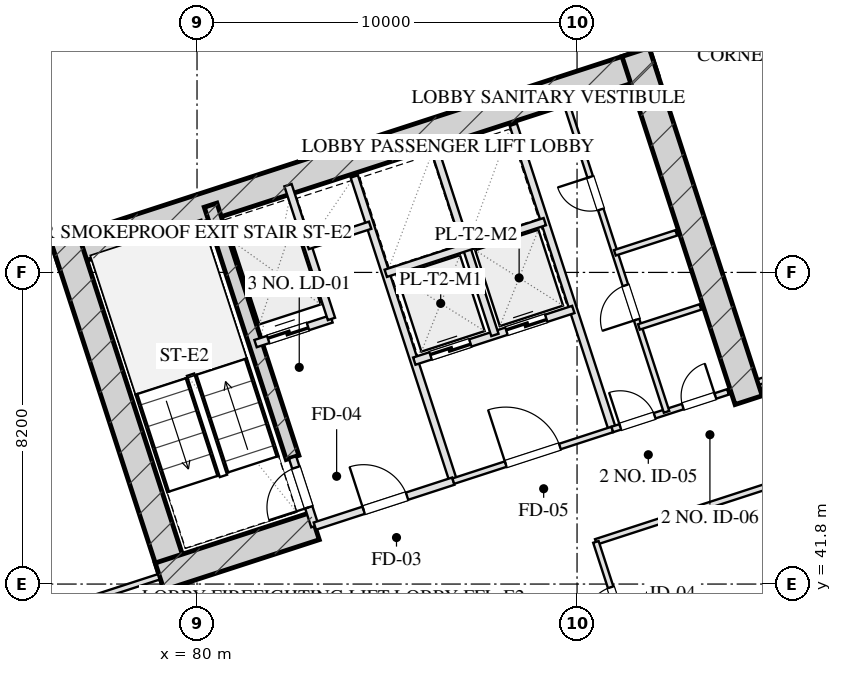
"""IFC4 building model, lengths in metres.
Left out: names, types, materials, properties, quantities, classifications, styles, units other than length and angle.
Written with IfcOpenShell. Run it as: python <this file> out.ifc"""

import sys

from ifc_helpers import new_model, si_unit, direction, frame, frame_2d, origin, place, context, subcontext, project, spatial, rectangle, extrude, element, fill, save


model = new_model("IFC4")
c1 = context("Model", 3, precision=1e-05, world=origin(), true_north=direction((0.0, 1.0)))
c2 = subcontext(c1, "Body", "Model", "MODEL_VIEW")
j1 = project(units=[si_unit("LENGTHUNIT", "METRE"), si_unit("PLANEANGLEUNIT", "RADIAN")], contexts=[c1])
p1 = place(None, origin())
s1 = spatial("IfcSite", under=j1, at=p1, CompositionType="ELEMENT")
p2 = place(p1, origin())
s2 = spatial("IfcBuilding", under=s1, at=p2, CompositionType="ELEMENT")
p3 = place(p2, frame((0.0, 0.0, 67.85)))
s3 = spatial("IfcBuildingStorey", under=s2, at=p3, CompositionType="ELEMENT", Elevation=67.85)
p4 = place(p3, frame((76.272, 50.443, 0.0), z_axis=(0.0, 0.0, 1.0), x_axis=(0.951056072937, 0.309018358888, 0.0)))
e1 = element("IfcWall", 1, at=p4, inside=s3, PredefinedType="SHEAR", context=c2, shape_type="SweptSolid", body=[
    extrude(rectangle(XDim=16.55, YDim=0.75, at=frame_2d((8.275, 0.0))), origin(), (0.0, 0.0, 1.0), 3.45),
])
for number, where, z_axis, x_axis in (
    (2, (79.489, 41.756, 0.0), (0.0, 0.0, 1.0), (-0.309, 0.951, 0.0)),
    (3, (94.515, 46.639, 0.0), (0.0, 0.0, 1.0), (-0.309, 0.951, 0.0)),
):
    element("IfcWall", number, at=place(p3, frame(where, z_axis=z_axis, x_axis=x_axis)), inside=s3, PredefinedType="SHEAR", context=c2, shape_type="SweptSolid", body=[
        extrude(rectangle(XDim=9.63, YDim=0.75, at=frame_2d((4.815, 0.0))), origin(), (0.0, 0.0, 1.0), 3.45),
    ])
p5 = place(p3, frame((82.514, 45.131, 0.0), z_axis=(0.0, 0.0, 1.0), x_axis=(-0.308988790936, 0.951065679686, 0.0)))
e4 = element("IfcWall", 4, at=p5, inside=s3, PredefinedType="SHEAR", context=c2, shape_type="SweptSolid", body=[
    extrude(rectangle(XDim=6.98, YDim=0.35, at=frame_2d((3.49, 0.0))), origin(), (0.0, 0.0, 1.0), 3.45),
])
p6 = place(p3, frame((79.016, 41.997, 0.0), z_axis=(0.0, 0.0, 1.0), x_axis=(0.95106038264, 0.309005094736, 0.0)))
e5 = element("IfcWall", 5, at=p6, inside=s3, PredefinedType="SHEAR", context=c2, shape_type="SweptSolid", body=[
    extrude(rectangle(XDim=4.295, YDim=0.75, at=frame_2d((2.147, 0.0))), origin(), (0.0, 0.0, 1.0), 3.45),
])
p7 = place(p3, frame((79.655, 4.352, 0.0), z_axis=(0.0, 0.0, 1.0), x_axis=(-0.309014526607, 0.951057318118, 0.0)))
e6 = element("IfcWall", 6, at=p7, inside=s3, PredefinedType="SOLIDWALL", context=c2, shape_type="SweptSolid", body=[
    extrude(rectangle(XDim=50.0, YDim=0.4, at=frame_2d((25.0, 0.0))), origin(), (0.0, 0.0, 1.0), 2.61),
])
p8 = place(p7, frame((30.15, 0.0, 0.75)))
e7 = element("IfcOpeningElement", 7, at=p8, cuts=e6, PredefinedType="OPENING", context=c2, shape_type="SweptSolid", body=[
    extrude(rectangle(XDim=2.5, YDim=1.46, at=frame_2d((1.25, 0.73))), frame((0.0, 0.21, 0.0), z_axis=(0.0, -1.0, 0.0), x_axis=(1.0, 0.0, 0.0)), (0.0, 0.0, 1.0), 0.42),
])
p9 = place(p7, frame((18.65, 0.0, 0.0)))
e8 = element("IfcOpeningElement", 8, at=p9, cuts=e6, PredefinedType="OPENING", context=c2, shape_type="SweptSolid", body=[
    extrude(rectangle(XDim=1.1, YDim=2.15, at=frame_2d((0.55, 1.075))), frame((0.0, 0.21, 0.0), z_axis=(0.0, -1.0, 0.0), x_axis=(1.0, 0.0, 0.0)), (0.0, 0.0, 1.0), 0.42),
])
p10 = place(p3, frame((66.002, 55.433, 0.0), z_axis=(0.0, 0.0, 1.0), x_axis=(0.951055939317, 0.309018770125, 0.0)))
e9 = element("IfcWall", 9, at=p10, inside=s3, PredefinedType="SOLIDWALL", context=c2, shape_type="SweptSolid", body=[
    extrude(rectangle(XDim=32.4, YDim=0.4, at=frame_2d((16.2, 0.0))), origin(), (0.0, 0.0, 1.0), 2.61),
])
p11 = place(p3, frame((83.101, 43.324, 0.0), z_axis=(0.0, 0.0, 1.0), x_axis=(-0.309048298632, 0.951046344356, 0.0)))
e10 = element("IfcWall", 10, at=p11, inside=s3, PredefinedType="PARTITIONING", context=c2, shape_type="SweptSolid", body=[
    extrude(rectangle(XDim=1.9, YDim=0.2, at=frame_2d((0.95, 0.0))), origin(), (0.0, 0.0, 1.0), 3.175),
])
p12 = place(p11, frame((0.52, 0.0, 0.0)))
e11 = element("IfcOpeningElement", 11, at=p12, cuts=e10, PredefinedType="OPENING", context=c2, shape_type="SweptSolid", body=[
    extrude(rectangle(XDim=1.1, YDim=2.05, at=frame_2d((0.55, 1.025))), frame((0.0, 0.11, 0.0), z_axis=(0.0, -1.0, 0.0), x_axis=(1.0, 0.0, 0.0)), (0.0, 0.0, 1.0), 0.22),
])
p13 = place(p3, frame((86.743, 44.508, 0.0), z_axis=(0.0, 0.0, 1.0), x_axis=(-0.309016001439, 0.951056838919, 0.0)))
e12 = element("IfcWall", 12, at=p13, inside=s3, PredefinedType="PARTITIONING", context=c2, shape_type="SweptSolid", body=[
    extrude(rectangle(XDim=8.43, YDim=0.2, at=frame_2d((4.215, 0.0))), origin(), (0.0, 0.0, 1.0), 3.175),
])
p14 = place(p3, frame((83.101, 43.324, 0.0), z_axis=(0.0, 0.0, 1.0), x_axis=(0.951052804469, 0.309028417967, 0.0)))
e13 = element("IfcWall", 13, at=p14, inside=s3, PredefinedType="PARTITIONING", context=c2, shape_type="SweptSolid", body=[
    extrude(rectangle(XDim=3.83, YDim=0.2, at=frame_2d((1.915, 0.0))), origin(), (0.0, 0.0, 1.0), 3.175),
])
p15 = place(p14, frame((1.35, 0.0, 0.0)))
e14 = element("IfcOpeningElement", 14, at=p15, cuts=e13, PredefinedType="OPENING", context=c2, shape_type="SweptSolid", body=[
    extrude(rectangle(XDim=1.2, YDim=2.05, at=frame_2d((0.6, 1.025))), frame((0.0, 0.11, 0.0), z_axis=(0.0, -1.0, 0.0), x_axis=(1.0, 0.0, 0.0)), (0.0, 0.0, 1.0), 0.22),
])
p16 = place(p3, frame((81.54, 48.127, 0.0), z_axis=(0.0, 0.0, 1.0), x_axis=(0.951062257173, 0.308999325213, 0.0)))
e15 = element("IfcWall", 15, at=p16, inside=s3, PredefinedType="PARTITIONING", context=c2, shape_type="SweptSolid", body=[
    extrude(rectangle(XDim=2.1, YDim=0.2, at=frame_2d((1.05, 0.0))), origin(), (0.0, 0.0, 1.0), 3.175),
])
p17 = place(p16, frame((0.35, 0.0, 0.0)))
e16 = element("IfcOpeningElement", 16, at=p17, cuts=e15, PredefinedType="OPENING", context=c2, shape_type="SweptSolid", body=[
    extrude(rectangle(XDim=1.1, YDim=2.05, at=frame_2d((0.55, 1.025))), frame((0.0, 0.11, 0.0), z_axis=(0.0, -1.0, 0.0), x_axis=(1.0, 0.0, 0.0)), (0.0, 0.0, 1.0), 0.22),
])
p18 = place(p3, frame((83.538, 48.776, 0.0), z_axis=(0.0, 0.0, 1.0), x_axis=(-0.3089935693, 0.951064127245, 0.0)))
e17 = element("IfcWall", 17, at=p18, inside=s3, PredefinedType="PARTITIONING", context=c2, shape_type="SweptSolid", body=[
    extrude(rectangle(XDim=3.7, YDim=0.2, at=frame_2d((1.85, 0.0))), origin(), (0.0, 0.0, 1.0), 3.175),
])
p19 = place(p3, frame((82.91, 50.707, 0.0), z_axis=(0.0, 0.0, 1.0), x_axis=(0.951041328149, 0.309063734775, 0.0)))
e18 = element("IfcWall", 18, at=p19, inside=s3, PredefinedType="PARTITIONING", context=c2, shape_type="SweptSolid", body=[
    extrude(rectangle(XDim=1.73, YDim=0.2, at=frame_2d((0.865, 0.0))), origin(), (0.0, 0.0, 1.0), 3.175),
])
p20 = place(p3, frame((90.928, 45.868, 0.0), z_axis=(0.0, 0.0, 1.0), x_axis=(-0.309042196757, 0.951048327176, 0.0)))
e19 = element("IfcWall", 19, at=p20, inside=s3, PredefinedType="PARTITIONING", context=c2, shape_type="SweptSolid", body=[
    extrude(rectangle(XDim=8.43, YDim=0.2, at=frame_2d((4.215, 0.0))), origin(), (0.0, 0.0, 1.0), 3.175),
])
p21 = place(p3, frame((86.743, 44.508, 0.0), z_axis=(0.0, 0.0, 1.0), x_axis=(0.951063829732, 0.308994485023, 0.0)))
e20 = element("IfcWall", 20, at=p21, inside=s3, PredefinedType="PARTITIONING", context=c2, shape_type="SweptSolid", body=[
    extrude(rectangle(XDim=4.4, YDim=0.15, at=frame_2d((2.2, 0.0))), origin(), (0.0, 0.0, 1.0), 3.175),
])
p22 = place(p21, frame((1.45, 0.0, 0.0)))
e21 = element("IfcOpeningElement", 21, at=p22, cuts=e20, PredefinedType="OPENING", context=c2, shape_type="SweptSolid", body=[
    extrude(rectangle(XDim=1.5, YDim=2.05, at=frame_2d((0.75, 1.025))), frame((0.0, 0.085, 0.0), z_axis=(0.0, -1.0, 0.0), x_axis=(1.0, 0.0, 0.0)), (0.0, 0.0, 1.0), 0.17),
])
p23 = place(p3, frame((85.718, 47.666, 0.0), z_axis=(0.0, 0.0, 1.0), x_axis=(0.951058531764, 0.30901079133, 0.0)))
e22 = element("IfcWall", 22, at=p23, inside=s3, PredefinedType="PARTITIONING", context=c2, shape_type="SweptSolid", body=[
    extrude(rectangle(XDim=4.4, YDim=0.2, at=frame_2d((2.2, 0.0))), origin(), (0.0, 0.0, 1.0), 3.175),
])
p24 = place(p23, frame((0.45, 0.0, 0.0)))
e23 = element("IfcOpeningElement", 23, at=p24, cuts=e22, PredefinedType="OPENING", context=c2, shape_type="SweptSolid", body=[
    extrude(rectangle(XDim=1.1, YDim=2.05, at=frame_2d((0.55, 1.025))), frame((0.0, 0.11, 0.0), z_axis=(0.0, -1.0, 0.0), x_axis=(1.0, 0.0, 0.0)), (0.0, 0.0, 1.0), 0.22),
])
p25 = place(p23, frame((2.55, 0.0, 0.0)))
e24 = element("IfcOpeningElement", 24, at=p25, cuts=e22, PredefinedType="OPENING", context=c2, shape_type="SweptSolid", body=[
    extrude(rectangle(XDim=1.1, YDim=2.05, at=frame_2d((0.55, 1.025))), frame((0.0, 0.11, 0.0), z_axis=(0.0, -1.0, 0.0), x_axis=(1.0, 0.0, 0.0)), (0.0, 0.0, 1.0), 0.22),
])
p26 = place(p3, frame((87.838, 48.354, 0.0), z_axis=(0.0, 0.0, 1.0), x_axis=(-0.3090093719, 0.951058992953, 0.0)))
e25 = element("IfcWall", 25, at=p26, inside=s3, PredefinedType="PARTITIONING", context=c2, shape_type="SweptSolid", body=[
    extrude(rectangle(XDim=5.11, YDim=0.2, at=frame_2d((2.555, 0.0))), origin(), (0.0, 0.0, 1.0), 3.175),
])
p27 = place(p3, frame((84.967, 49.977, 0.0), z_axis=(0.0, 0.0, 1.0), x_axis=(0.951063829732, 0.308994485023, 0.0)))
e26 = element("IfcWall", 26, at=p27, inside=s3, PredefinedType="PARTITIONING", context=c2, shape_type="SweptSolid", body=[
    extrude(rectangle(XDim=4.4, YDim=0.2, at=frame_2d((2.2, 0.0))), origin(), (0.0, 0.0, 1.0), 3.175),
])
p28 = place(p3, frame((90.928, 45.868, 0.0), z_axis=(0.0, 0.0, 1.0), x_axis=(0.951059297078, 0.309008435874, 0.0)))
e27 = element("IfcWall", 27, at=p28, inside=s3, PredefinedType="PARTITIONING", context=c2, shape_type="SweptSolid", body=[
    extrude(rectangle(XDim=3.2, YDim=0.15, at=frame_2d((1.6, 0.0))), origin(), (0.0, 0.0, 1.0), 3.175),
])
p29 = place(p28, frame((0.22, 0.0, 0.0)))
e28 = element("IfcOpeningElement", 28, at=p29, cuts=e27, PredefinedType="OPENING", context=c2, shape_type="SweptSolid", body=[
    extrude(rectangle(XDim=0.95, YDim=2.05, at=frame_2d((0.475, 1.025))), frame((0.0, 0.085, 0.0), z_axis=(0.0, -1.0, 0.0), x_axis=(1.0, 0.0, 0.0)), (0.0, 0.0, 1.0), 0.17),
])
p30 = place(p28, frame((1.95, 0.0, 0.0)))
e29 = element("IfcOpeningElement", 29, at=p30, cuts=e27, PredefinedType="OPENING", context=c2, shape_type="SweptSolid", body=[
    extrude(rectangle(XDim=0.9, YDim=2.05, at=frame_2d((0.45, 1.025))), frame((0.0, 0.085, 0.0), z_axis=(0.0, -1.0, 0.0), x_axis=(1.0, 0.0, 0.0)), (0.0, 0.0, 1.0), 0.17),
])
p31 = place(p3, frame((92.355, 46.331, 0.0), z_axis=(0.0, 0.0, 1.0), x_axis=(-0.309007490203, 0.951059604335, 0.0)))
e30 = element("IfcWall", 30, at=p31, inside=s3, PredefinedType="PARTITIONING", context=c2, shape_type="SweptSolid", body=[
    extrude(rectangle(XDim=8.43, YDim=0.15, at=frame_2d((4.215, 0.0))), origin(), (0.0, 0.0, 1.0), 3.175),
])
p32 = place(p31, frame((2.55, 0.0, 0.0)))
e31 = element("IfcOpeningElement", 31, at=p32, cuts=e30, PredefinedType="OPENING", context=c2, shape_type="SweptSolid", body=[
    extrude(rectangle(XDim=0.95, YDim=2.05, at=frame_2d((0.475, 1.025))), frame((0.0, 0.085, 0.0), z_axis=(0.0, -1.0, 0.0), x_axis=(1.0, 0.0, 0.0)), (0.0, 0.0, 1.0), 0.17),
])
p33 = place(p31, frame((5.6, 0.0, 0.0)))
e32 = element("IfcOpeningElement", 32, at=p33, cuts=e30, PredefinedType="OPENING", context=c2, shape_type="SweptSolid", body=[
    extrude(rectangle(XDim=0.9, YDim=2.05, at=frame_2d((0.45, 1.025))), frame((0.0, 0.085, 0.0), z_axis=(0.0, -1.0, 0.0), x_axis=(1.0, 0.0, 0.0)), (0.0, 0.0, 1.0), 0.17),
])
p34 = place(p3, frame((90.995, 50.516, 0.0), z_axis=(0.0, 0.0, 1.0), x_axis=(0.951040401051, 0.309066587596, 0.0)))
e33 = element("IfcWall", 33, at=p34, inside=s3, PredefinedType="PARTITIONING", context=c2, shape_type="SweptSolid", body=[
    extrude(rectangle(XDim=1.7, YDim=0.15, at=frame_2d((0.85, 0.0))), origin(), (0.0, 0.0, 1.0), 3.175),
])
p35 = place(p3, frame((91.628, 48.566, 0.0), z_axis=(0.0, 0.0, 1.0), x_axis=(0.951054116971, 0.309024378638, 0.0)))
e34 = element("IfcWall", 34, at=p35, inside=s3, PredefinedType="PARTITIONING", context=c2, shape_type="SweptSolid", body=[
    extrude(rectangle(XDim=1.7, YDim=0.15, at=frame_2d((0.85, 0.0))), origin(), (0.0, 0.0, 1.0), 3.175),
])
p36 = place(p3, frame((68.721, 38.652, 0.0), z_axis=(0.0, 0.0, 1.0), x_axis=(0.951056658866, 0.309016555588, 0.0)))
e35 = element("IfcWall", 35, at=p36, inside=s3, PredefinedType="PARTITIONING", context=c2, shape_type="SweptSolid", body=[
    extrude(rectangle(XDim=10.8, YDim=0.15, at=frame_2d((5.4, 0.0))), origin(), (0.0, 0.0, 1.0), 3.175),
])
p37 = place(p36, frame((4.536, 0.0, 0.0)))
e36 = element("IfcOpeningElement", 36, at=p37, cuts=e35, PredefinedType="OPENING", context=c2, shape_type="SweptSolid", body=[
    extrude(rectangle(XDim=1.0, YDim=2.05, at=frame_2d((0.5, 1.025))), frame((0.0, 0.085, 0.0), z_axis=(0.0, -1.0, 0.0), x_axis=(1.0, 0.0, 0.0)), (0.0, 0.0, 1.0), 0.17),
])
p38 = place(p3, frame((94.78, 47.119, 0.0), z_axis=(0.0, 0.0, 1.0), x_axis=(0.951054294345, 0.309023832749, 0.0)))
e37 = element("IfcWall", 37, at=p38, inside=s3, PredefinedType="PARTITIONING", context=c2, shape_type="SweptSolid", body=[
    extrude(rectangle(XDim=10.2, YDim=0.15, at=frame_2d((5.1, 0.0))), origin(), (0.0, 0.0, 1.0), 3.175),
])
p39 = place(p38, frame((4.284, 0.0, 0.0)))
e38 = element("IfcOpeningElement", 38, at=p39, cuts=e37, PredefinedType="OPENING", context=c2, shape_type="SweptSolid", body=[
    extrude(rectangle(XDim=1.0, YDim=2.05, at=frame_2d((0.5, 1.025))), frame((0.0, 0.085, 0.0), z_axis=(0.0, -1.0, 0.0), x_axis=(1.0, 0.0, 0.0)), (0.0, 0.0, 1.0), 0.17),
])
p40 = place(p3, frame((69.549, 36.103, 0.0), z_axis=(0.0, 0.0, 1.0), x_axis=(0.951057299418, 0.309014584159, 0.0)))
e39 = element("IfcWall", 39, at=p40, inside=s3, PredefinedType="PARTITIONING", context=c2, shape_type="SweptSolid", body=[
    extrude(rectangle(XDim=17.375, YDim=0.15, at=frame_2d((8.688, 0.0))), origin(), (0.0, 0.0, 1.0), 3.175),
])
p41 = place(p3, frame((90.496, 42.909, 0.0), z_axis=(0.0, 0.0, 1.0), x_axis=(0.951055837847, 0.309019082414, 0.0)))
e40 = element("IfcWall", 40, at=p41, inside=s3, PredefinedType="PARTITIONING", context=c2, shape_type="SweptSolid", body=[
    extrude(rectangle(XDim=15.575, YDim=0.15, at=frame_2d((7.788, 0.0))), origin(), (0.0, 0.0, 1.0), 3.175),
])
p42 = place(p3, frame((95.638, 27.084, 0.0), z_axis=(0.0, 0.0, 1.0), x_axis=(-0.30901773025, 0.951056277195, 0.0)))
e41 = element("IfcWall", 41, at=p42, inside=s3, PredefinedType="PARTITIONING", context=c2, shape_type="SweptSolid", body=[
    extrude(rectangle(XDim=16.64, YDim=0.15, at=frame_2d((8.32, 0.0))), origin(), (0.0, 0.0, 1.0), 3.175),
])
p43 = place(p42, frame((1.655, 0.0, 0.0)))
e42 = element("IfcOpeningElement", 42, at=p43, cuts=e41, PredefinedType="OPENING", context=c2, shape_type="SweptSolid", body=[
    extrude(rectangle(XDim=1.0, YDim=2.05, at=frame_2d((0.5, 1.025))), frame((0.0, 0.085, 0.0), z_axis=(0.0, -1.0, 0.0), x_axis=(1.0, 0.0, 0.0)), (0.0, 0.0, 1.0), 0.17),
])
p44 = place(p42, frame((6.155, 0.0, 0.0)))
e43 = element("IfcOpeningElement", 43, at=p44, cuts=e41, PredefinedType="OPENING", context=c2, shape_type="SweptSolid", body=[
    extrude(rectangle(XDim=1.05, YDim=2.05, at=frame_2d((0.525, 1.025))), frame((0.0, 0.085, 0.0), z_axis=(0.0, -1.0, 0.0), x_axis=(1.0, 0.0, 0.0)), (0.0, 0.0, 1.0), 0.17),
])
p45 = place(p42, frame((10.565, 0.0, 0.0)))
e44 = element("IfcOpeningElement", 44, at=p45, cuts=e41, PredefinedType="OPENING", context=c2, shape_type="SweptSolid", body=[
    extrude(rectangle(XDim=1.0, YDim=2.05, at=frame_2d((0.5, 1.025))), frame((0.0, 0.085, 0.0), z_axis=(0.0, -1.0, 0.0), x_axis=(1.0, 0.0, 0.0)), (0.0, 0.0, 1.0), 0.17),
])
p46 = place(p42, frame((14.385, 0.0, 0.0)))
e45 = element("IfcOpeningElement", 45, at=p46, cuts=e41, PredefinedType="OPENING", context=c2, shape_type="SweptSolid", body=[
    extrude(rectangle(XDim=1.0, YDim=2.05, at=frame_2d((0.5, 1.025))), frame((0.0, 0.085, 0.0), z_axis=(0.0, -1.0, 0.0), x_axis=(1.0, 0.0, 0.0)), (0.0, 0.0, 1.0), 0.17),
])
p47 = place(p3, frame((91.581, 39.57, 0.0), z_axis=(0.0, 0.0, 1.0), x_axis=(0.951055837847, 0.309019082414, 0.0)))
e46 = element("IfcWall", 46, at=p47, inside=s3, PredefinedType="PARTITIONING", context=c2, shape_type="SweptSolid", body=[
    extrude(rectangle(XDim=15.575, YDim=0.15, at=frame_2d((7.788, 0.0))), origin(), (0.0, 0.0, 1.0), 3.175),
])
p48 = place(p12, origin())
e47 = element("IfcDoor", 47, at=p48, inside=s3, OperationType="SINGLE_SWING_LEFT", PredefinedType="DOOR", context=c2, shape_type="SweptSolid", body=[
    extrude(rectangle(XDim=1.1, YDim=2.05, at=frame_2d((0.55, 1.025))), frame((0.0, 0.025, 0.0), z_axis=(0.0, -1.0, 0.0), x_axis=(1.0, 0.0, 0.0)), (0.0, 0.0, 1.0), 0.05),
])
fill(e11, e47)
p49 = place(p15, origin())
e48 = element("IfcDoor", 48, at=p49, inside=s3, OperationType="SINGLE_SWING_LEFT", PredefinedType="DOOR", context=c2, shape_type="SweptSolid", body=[
    extrude(rectangle(XDim=1.2, YDim=2.05, at=frame_2d((0.6, 1.025))), frame((0.0, 0.025, 0.0), z_axis=(0.0, -1.0, 0.0), x_axis=(1.0, 0.0, 0.0)), (0.0, 0.0, 1.0), 0.05),
])
fill(e14, e48)
p50 = place(p17, origin())
e49 = element("IfcDoor", 49, at=p50, inside=s3, OperationType="DOUBLE_DOOR_SLIDING", PredefinedType="DOOR", context=c2, shape_type="SweptSolid", body=[
    extrude(rectangle(XDim=1.1, YDim=2.05, at=frame_2d((0.55, 1.025))), frame((0.0, 0.025, 0.0), z_axis=(0.0, -1.0, 0.0), x_axis=(1.0, 0.0, 0.0)), (0.0, 0.0, 1.0), 0.05),
])
fill(e16, e49)
p51 = place(p22, origin())
e50 = element("IfcDoor", 50, at=p51, inside=s3, OperationType="SINGLE_SWING_LEFT", PredefinedType="DOOR", context=c2, shape_type="SweptSolid", body=[
    extrude(rectangle(XDim=1.5, YDim=2.05, at=frame_2d((0.75, 1.025))), frame((0.0, 0.025, 0.0), z_axis=(0.0, -1.0, 0.0), x_axis=(1.0, 0.0, 0.0)), (0.0, 0.0, 1.0), 0.05),
])
fill(e21, e50)
p52 = place(p24, origin())
e51 = element("IfcDoor", 51, at=p52, inside=s3, OperationType="DOUBLE_DOOR_SLIDING", PredefinedType="DOOR", context=c2, shape_type="SweptSolid", body=[
    extrude(rectangle(XDim=1.1, YDim=2.05, at=frame_2d((0.55, 1.025))), frame((0.0, 0.025, 0.0), z_axis=(0.0, -1.0, 0.0), x_axis=(1.0, 0.0, 0.0)), (0.0, 0.0, 1.0), 0.05),
])
fill(e23, e51)
p53 = place(p25, origin())
e52 = element("IfcDoor", 52, at=p53, inside=s3, OperationType="DOUBLE_DOOR_SLIDING", PredefinedType="DOOR", context=c2, shape_type="SweptSolid", body=[
    extrude(rectangle(XDim=1.1, YDim=2.05, at=frame_2d((0.55, 1.025))), frame((0.0, 0.025, 0.0), z_axis=(0.0, -1.0, 0.0), x_axis=(1.0, 0.0, 0.0)), (0.0, 0.0, 1.0), 0.05),
])
fill(e24, e52)
p54 = place(p29, origin())
e53 = element("IfcDoor", 53, at=p54, inside=s3, OperationType="SINGLE_SWING_LEFT", PredefinedType="DOOR", context=c2, shape_type="SweptSolid", body=[
    extrude(rectangle(XDim=0.95, YDim=2.05, at=frame_2d((0.475, 1.025))), frame((0.0, 0.025, 0.0), z_axis=(0.0, -1.0, 0.0), x_axis=(1.0, 0.0, 0.0)), (0.0, 0.0, 1.0), 0.05),
])
fill(e28, e53)
p55 = place(p30, origin())
e54 = element("IfcDoor", 54, at=p55, inside=s3, OperationType="SINGLE_SWING_RIGHT", PredefinedType="DOOR", context=c2, shape_type="SweptSolid", body=[
    extrude(rectangle(XDim=0.9, YDim=2.05, at=frame_2d((0.45, 1.025))), frame((0.0, 0.025, 0.0), z_axis=(0.0, -1.0, 0.0), x_axis=(1.0, 0.0, 0.0)), (0.0, 0.0, 1.0), 0.05),
])
fill(e29, e54)
p56 = place(p32, origin())
e55 = element("IfcDoor", 55, at=p56, inside=s3, OperationType="SINGLE_SWING_LEFT", PredefinedType="DOOR", context=c2, shape_type="SweptSolid", body=[
    extrude(rectangle(XDim=0.95, YDim=2.05, at=frame_2d((0.475, 1.025))), frame((0.0, 0.025, 0.0), z_axis=(0.0, -1.0, 0.0), x_axis=(1.0, 0.0, 0.0)), (0.0, 0.0, 1.0), 0.05),
])
fill(e31, e55)
p57 = place(p33, origin())
e56 = element("IfcDoor", 56, at=p57, inside=s3, OperationType="SINGLE_SWING_RIGHT", PredefinedType="DOOR", context=c2, shape_type="SweptSolid", body=[
    extrude(rectangle(XDim=0.9, YDim=2.05, at=frame_2d((0.45, 1.025))), frame((0.0, 0.025, 0.0), z_axis=(0.0, -1.0, 0.0), x_axis=(1.0, 0.0, 0.0)), (0.0, 0.0, 1.0), 0.05),
])
fill(e32, e56)
p58 = place(p46, origin())
e57 = element("IfcDoor", 57, at=p58, inside=s3, OperationType="SINGLE_SWING_LEFT", PredefinedType="DOOR", context=c2, shape_type="SweptSolid", body=[
    extrude(rectangle(XDim=1.0, YDim=2.05, at=frame_2d((0.5, 1.025))), frame((0.0, 0.025, 0.0), z_axis=(0.0, -1.0, 0.0), x_axis=(1.0, 0.0, 0.0)), (0.0, 0.0, 1.0), 0.05),
])
fill(e45, e57)
save(model, sys.argv[1])
